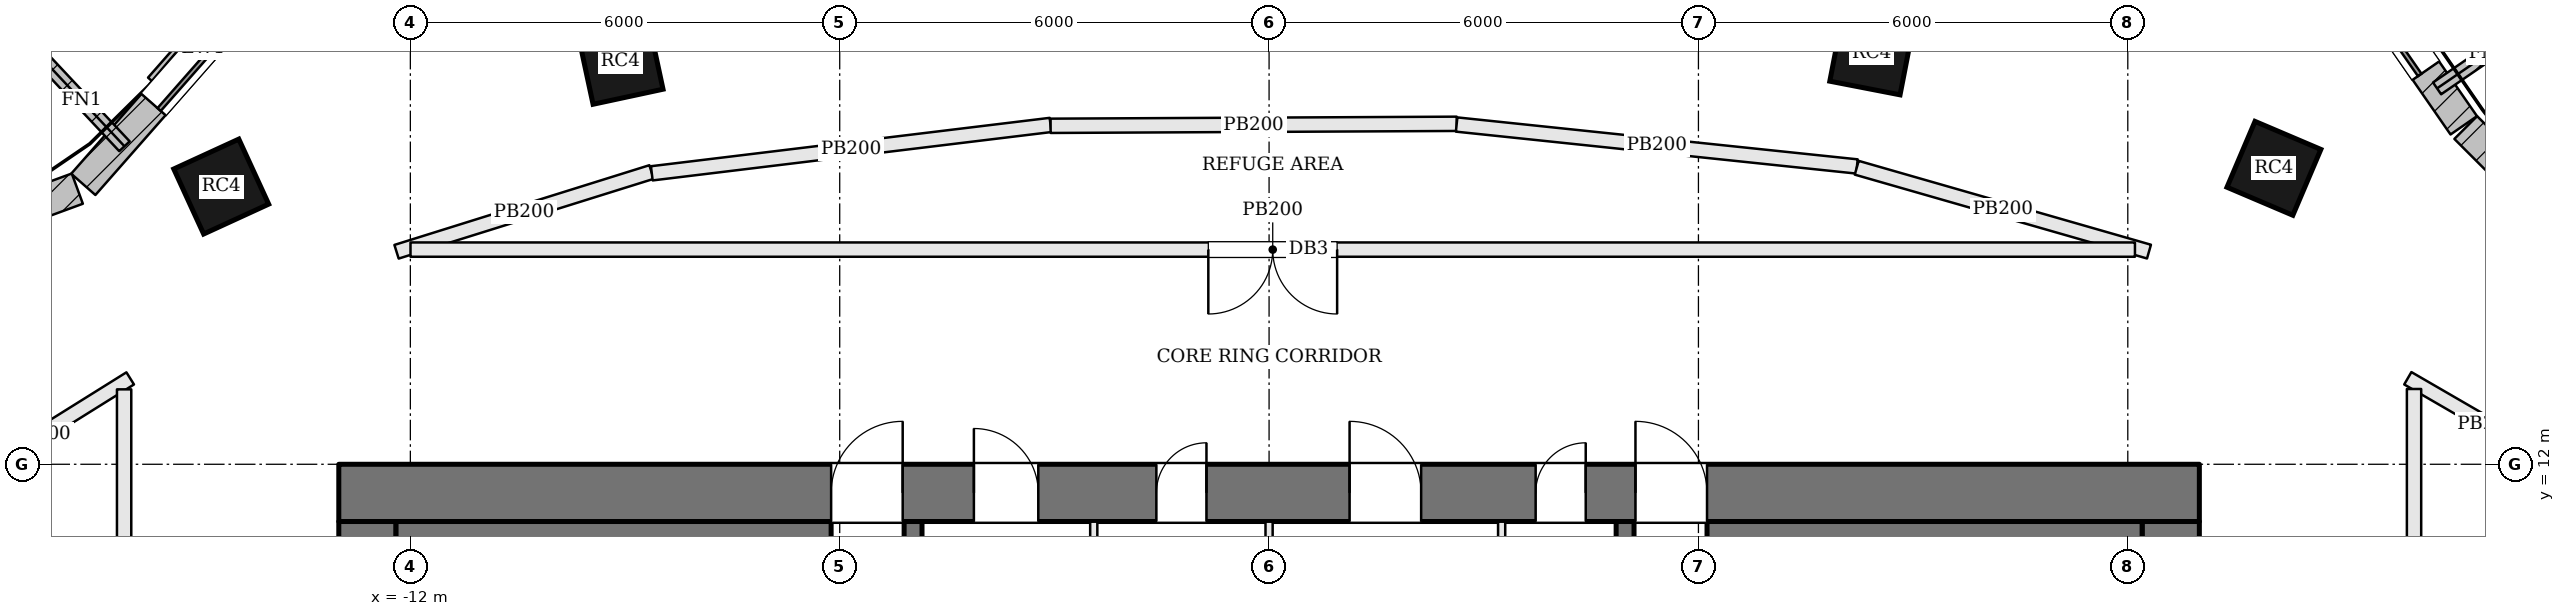
"""IFC4 building model, lengths in metres.
Left out: names, types, materials, properties, quantities, classifications, styles, units other than length and angle.
Written with IfcOpenShell. Run it as: python <this file> out.ifc"""

import sys

from ifc_helpers import new_model, si_unit, direction, frame, frame_2d, origin, origin_2d, place, context, subcontext, project, spatial, rectangle, extrude, element, fill, save


model = new_model("IFC4")
c1 = context("Model", 3, precision=1e-05, world=origin(), true_north=direction((0.0, 1.0)))
c2 = subcontext(c1, "Body", "Model", "MODEL_VIEW")
j1 = project(units=[si_unit("LENGTHUNIT", "METRE"), si_unit("PLANEANGLEUNIT", "RADIAN")], contexts=[c1])
p1 = place(None, origin())
s1 = spatial("IfcSite", under=j1, at=p1, CompositionType="ELEMENT")
p2 = place(p1, origin())
s2 = spatial("IfcBuilding", under=s1, at=p2, CompositionType="ELEMENT")
p3 = place(p2, frame((0.0, 0.0, 240.9)))
s3 = spatial("IfcBuildingStorey", under=s2, at=p3, CompositionType="ELEMENT", Elevation=240.9)
p4 = place(p3, frame((-13.0, 11.6, 0.0), z_axis=(0.0, 0.0, 1.0), x_axis=(1.0, 0.0, 0.0)))
e1 = element("IfcWall", 1, at=p4, inside=s3, PredefinedType="SHEAR", context=c2, shape_type="SweptSolid", body=[
    extrude(rectangle(XDim=26.0, YDim=0.8, at=frame_2d((13.0, 0.0))), origin(), (0.0, 0.0, 1.0), 3.9),
])
p5 = place(p4, frame((8.875, 0.0, 0.0)))
e2 = element("IfcOpeningElement", 2, at=p5, cuts=e1, PredefinedType="OPENING", context=c2, shape_type="SweptSolid", body=[
    extrude(rectangle(XDim=0.9, YDim=2.1, at=frame_2d((0.45, 1.05))), frame((0.0, 0.41, 0.0), z_axis=(0.0, -1.0, 0.0), x_axis=(1.0, 0.0, 0.0)), (0.0, 0.0, 1.0), 0.82),
])
p6 = place(p4, frame((11.425, 0.0, 0.0)))
e3 = element("IfcOpeningElement", 3, at=p6, cuts=e1, PredefinedType="OPENING", context=c2, shape_type="SweptSolid", body=[
    extrude(rectangle(XDim=0.7, YDim=2.1, at=frame_2d((0.35, 1.05))), frame((0.0, 0.41, 0.0), z_axis=(0.0, -1.0, 0.0), x_axis=(1.0, 0.0, 0.0)), (0.0, 0.0, 1.0), 0.82),
])
p7 = place(p4, frame((14.125, 0.0, 0.0)))
e4 = element("IfcOpeningElement", 4, at=p7, cuts=e1, PredefinedType="OPENING", context=c2, shape_type="SweptSolid", body=[
    extrude(rectangle(XDim=1.0, YDim=2.1, at=frame_2d((0.5, 1.05))), frame((0.0, 0.41, 0.0), z_axis=(0.0, -1.0, 0.0), x_axis=(1.0, 0.0, 0.0)), (0.0, 0.0, 1.0), 0.82),
])
p8 = place(p4, frame((16.725, 0.0, 0.0)))
e5 = element("IfcOpeningElement", 5, at=p8, cuts=e1, PredefinedType="OPENING", context=c2, shape_type="SweptSolid", body=[
    extrude(rectangle(XDim=0.7, YDim=2.1, at=frame_2d((0.35, 1.05))), frame((0.0, 0.41, 0.0), z_axis=(0.0, -1.0, 0.0), x_axis=(1.0, 0.0, 0.0)), (0.0, 0.0, 1.0), 0.82),
])
p9 = place(p4, frame((6.88, 0.0, 0.0)))
e6 = element("IfcOpeningElement", 6, at=p9, cuts=e1, PredefinedType="OPENING", context=c2, shape_type="SweptSolid", body=[
    extrude(rectangle(XDim=1.0, YDim=2.1, at=frame_2d((0.5, 1.05))), frame((0.0, 0.41, 0.0), z_axis=(0.0, -1.0, 0.0), x_axis=(1.0, 0.0, 0.0)), (0.0, 0.0, 1.0), 0.82),
])
p10 = place(p4, frame((18.12, 0.0, 0.0)))
e7 = element("IfcOpeningElement", 7, at=p10, cuts=e1, PredefinedType="OPENING", context=c2, shape_type="SweptSolid", body=[
    extrude(rectangle(XDim=1.0, YDim=2.1, at=frame_2d((0.5, 1.05))), frame((0.0, 0.41, 0.0), z_axis=(0.0, -1.0, 0.0), x_axis=(1.0, 0.0, 0.0)), (0.0, 0.0, 1.0), 0.82),
])
p11 = place(p3, frame((12.6, -2.2, 0.0), z_axis=(0.0, 0.0, 1.0), x_axis=(0.0, 1.0, 0.0)))
e8 = element("IfcWall", 8, at=p11, inside=s3, PredefinedType="SHEAR", context=c2, shape_type="SweptSolid", body=[
    extrude(rectangle(XDim=13.4, YDim=0.8, at=frame_2d((6.7, 0.0))), origin(), (0.0, 0.0, 1.0), 3.9),
])
p12 = place(p11, frame((7.4, 0.0, 0.0)))
e9 = element("IfcOpeningElement", 9, at=p12, cuts=e8, PredefinedType="OPENING", context=c2, shape_type="SweptSolid", body=[
    extrude(rectangle(XDim=1.8, YDim=2.1, at=frame_2d((0.9, 1.05))), frame((0.0, 0.41, 0.0), z_axis=(0.0, -1.0, 0.0), x_axis=(1.0, 0.0, 0.0)), (0.0, 0.0, 1.0), 0.82),
])
p13 = place(p3, frame((-12.6, -2.2, 0.0), z_axis=(0.0, 0.0, 1.0), x_axis=(0.0, 1.0, 0.0)))
e10 = element("IfcWall", 10, at=p13, inside=s3, PredefinedType="SHEAR", context=c2, shape_type="SweptSolid", body=[
    extrude(rectangle(XDim=13.4, YDim=0.8, at=frame_2d((6.7, 0.0))), origin(), (0.0, 0.0, 1.0), 3.9),
])
p14 = place(p13, frame((4.2, 0.0, 0.0)))
e11 = element("IfcOpeningElement", 11, at=p14, cuts=e10, PredefinedType="OPENING", context=c2, shape_type="SweptSolid", body=[
    extrude(rectangle(XDim=1.8, YDim=2.1, at=frame_2d((0.9, 1.05))), frame((0.0, 0.41, 0.0), z_axis=(0.0, -1.0, 0.0), x_axis=(1.0, 0.0, 0.0)), (0.0, 0.0, 1.0), 0.82),
])
for number, where, z_axis, x_axis in (
    (12, (14.042, 16.136, 0.0), (0.0, 0.0, 1.0), (-0.92, 0.392, 0.0)),
    (13, (8.422, 17.749, 0.0), (0.0, 0.0, 1.0), (-0.982, 0.191, 0.0)),
    (14, (-9.063, 17.625, 0.0), (0.0, 0.0, 1.0), (-0.978, -0.21, 0.0)),
    (15, (-14.643, 15.881, 0.0), (0.0, 0.0, 1.0), (-0.909, -0.417, 0.0)),
):
    element("IfcColumn", number, at=place(p3, frame(where, z_axis=z_axis, x_axis=x_axis)), inside=s3, PredefinedType="COLUMN", context=c2, shape_type="SweptSolid", body=[
        extrude(rectangle(XDim=1.0, YDim=1.0, at=origin_2d()), origin(), (0.0, 0.0, 1.0), 3.9),
    ])
p15 = place(p3, frame((19.145, 14.285, 0.0), z_axis=(0.0, 0.0, 1.0), x_axis=(-0.707427521052, 0.706785895769, 0.0)))
e16 = element("IfcWall", 16, at=p15, inside=s3, PredefinedType="SOLIDWALL", context=c2, shape_type="SweptSolid", body=[
    extrude(rectangle(XDim=3.425, YDim=0.45, at=frame_2d((1.712, 0.0))), origin(), (0.0, 0.0, 1.0), 3.7),
])
p16 = place(p15, frame((0.662, 0.0, 0.9)))
e17 = element("IfcOpeningElement", 17, at=p16, cuts=e16, PredefinedType="OPENING", context=c2, shape_type="SweptSolid", body=[
    extrude(rectangle(XDim=2.1, YDim=2.3, at=frame_2d((1.05, 1.15))), frame((0.0, 0.235, 0.0), z_axis=(0.0, -1.0, 0.0), x_axis=(1.0, 0.0, 0.0)), (0.0, 0.0, 1.0), 0.47),
])
p17 = place(p3, frame((16.695, 16.737, 0.0), z_axis=(0.0, 0.0, 1.0), x_axis=(-0.569652445465, 0.821885692402, 0.0)))
e18 = element("IfcWall", 18, at=p17, inside=s3, PredefinedType="SOLIDWALL", context=c2, shape_type="SweptSolid", body=[
    extrude(rectangle(XDim=3.959, YDim=0.45, at=frame_2d((1.979, 0.0))), origin(), (0.0, 0.0, 1.0), 3.7),
])
p18 = place(p17, frame((0.929, 0.0, 0.9)))
e19 = element("IfcOpeningElement", 19, at=p18, cuts=e18, PredefinedType="OPENING", context=c2, shape_type="SweptSolid", body=[
    extrude(rectangle(XDim=2.1, YDim=2.3, at=frame_2d((1.05, 1.15))), frame((0.0, 0.235, 0.0), z_axis=(0.0, -1.0, 0.0), x_axis=(1.0, 0.0, 0.0)), (0.0, 0.0, 1.0), 0.47),
])
p19 = place(p3, frame((-13.221, 19.719, 0.0), z_axis=(0.0, 0.0, 1.0), x_axis=(-0.660424908916, -0.750892095899, 0.0)))
e20 = element("IfcWall", 20, at=p19, inside=s3, PredefinedType="SOLIDWALL", context=c2, shape_type="SweptSolid", body=[
    extrude(rectangle(XDim=5.071, YDim=0.45, at=frame_2d((2.535, 0.0))), origin(), (0.0, 0.0, 1.0), 3.7),
])
p20 = place(p19, frame((1.485, 0.0, 0.9)))
e21 = element("IfcOpeningElement", 21, at=p20, cuts=e20, PredefinedType="OPENING", context=c2, shape_type="SweptSolid", body=[
    extrude(rectangle(XDim=2.1, YDim=2.3, at=frame_2d((1.05, 1.15))), frame((0.0, 0.235, 0.0), z_axis=(0.0, -1.0, 0.0), x_axis=(1.0, 0.0, 0.0)), (0.0, 0.0, 1.0), 0.47),
])
p21 = place(p3, frame((-16.654, 15.852, 0.0), z_axis=(0.0, 0.0, 1.0), x_axis=(-0.938636568132, -0.344907803572, 0.0)))
e22 = element("IfcWall", 22, at=p21, inside=s3, PredefinedType="SOLIDWALL", context=c2, shape_type="SweptSolid", body=[
    extrude(rectangle(XDim=3.887, YDim=0.45, at=frame_2d((1.944, 0.0))), origin(), (0.0, 0.0, 1.0), 3.7),
])
p22 = place(p21, frame((1.044, 0.0, 0.9)))
e23 = element("IfcOpeningElement", 23, at=p22, cuts=e22, PredefinedType="OPENING", context=c2, shape_type="SweptSolid", body=[
    extrude(rectangle(XDim=1.8, YDim=2.3, at=frame_2d((0.9, 1.15))), frame((0.0, 0.235, 0.0), z_axis=(0.0, -1.0, 0.0), x_axis=(1.0, 0.0, 0.0)), (0.0, 0.0, 1.0), 0.47),
])
p23 = place(p3, frame((16.322, 17.253, 0.0), z_axis=(0.0, 0.0, 1.0), x_axis=(0.824440606412, 0.565948483962, 0.0)))
e24 = element("IfcWall", 24, at=p23, inside=s3, PredefinedType="SOLIDWALL", context=c2, shape_type="SweptSolid", body=[
    extrude(rectangle(XDim=1.75, YDim=0.2, at=frame_2d((0.875, 0.0))), origin(), (0.0, 0.0, 1.0), 3.7),
])
p24 = place(p3, frame((-15.995, 16.444, 0.0), z_axis=(0.0, 0.0, 1.0), x_axis=(-0.683852936488, 0.729619874494, 0.0)))
e25 = element("IfcWall", 25, at=p24, inside=s3, PredefinedType="SOLIDWALL", context=c2, shape_type="SweptSolid", body=[
    extrude(rectangle(XDim=1.75, YDim=0.2, at=frame_2d((0.875, 0.0))), origin(), (0.0, 0.0, 1.0), 3.7),
])
p25 = place(p3, frame((-13.339, 19.822, 3.9), z_axis=(0.0, 0.0, 1.0), x_axis=(-0.660445690116, -0.7508738179, 0.0)))
e26 = element("IfcWall", 26, at=p25, inside=s3, PredefinedType="PARAPET", context=c2, shape_type="SweptSolid", body=[
    extrude(rectangle(XDim=3.353, YDim=0.3, at=frame_2d((1.677, 0.0))), origin(), (0.0, 0.0, 1.0), 1.1),
])
p26 = place(p3, frame((-4.975, -2.2, 0.0), z_axis=(0.0, 0.0, 1.0), x_axis=(0.0, 1.0, 0.0)))
e27 = element("IfcWall", 27, at=p26, inside=s3, PredefinedType="SOLIDWALL", context=c2, shape_type="SweptSolid", body=[
    extrude(rectangle(XDim=13.4, YDim=0.25, at=frame_2d((6.7, 0.0))), origin(), (0.0, 0.0, 1.0), 3.7),
])
p27 = place(p26, frame((5.25, 0.0, 0.0)))
e28 = element("IfcOpeningElement", 28, at=p27, cuts=e27, PredefinedType="OPENING", context=c2, shape_type="SweptSolid", body=[
    extrude(rectangle(XDim=1.2, YDim=2.1, at=frame_2d((0.6, 1.05))), frame((0.0, 0.135, 0.0), z_axis=(0.0, -1.0, 0.0), x_axis=(1.0, 0.0, 0.0)), (0.0, 0.0, 1.0), 0.27),
])
p28 = place(p3, frame((4.975, 11.2, 0.0), z_axis=(0.0, 0.0, 1.0), x_axis=(0.0, -1.0, 0.0)))
e29 = element("IfcWall", 29, at=p28, inside=s3, PredefinedType="SOLIDWALL", context=c2, shape_type="SweptSolid", body=[
    extrude(rectangle(XDim=13.4, YDim=0.25, at=frame_2d((6.7, 0.0))), origin(), (0.0, 0.0, 1.0), 3.7),
])
p29 = place(p28, frame((5.25, 0.0, 0.0)))
e30 = element("IfcOpeningElement", 30, at=p29, cuts=e29, PredefinedType="OPENING", context=c2, shape_type="SweptSolid", body=[
    extrude(rectangle(XDim=1.2, YDim=2.1, at=frame_2d((0.6, 1.05))), frame((0.0, 0.135, 0.0), z_axis=(0.0, -1.0, 0.0), x_axis=(1.0, 0.0, 0.0)), (0.0, 0.0, 1.0), 0.27),
])
for number, where, z_axis, x_axis in (
    (31, (-12.2, 10.9, 0.0), (0.0, 0.0, 1.0), (1.0, 0.0, 0.0)),
    (32, (12.2, 10.9, 0.0), (0.0, 0.0, 1.0), (-1.0, 0.0, 0.0)),
):
    element("IfcWall", number, at=place(p3, frame(where, z_axis=z_axis, x_axis=x_axis)), inside=s3, PredefinedType="SOLIDWALL", context=c2, shape_type="SweptSolid", body=[
        extrude(rectangle(XDim=6.08, YDim=0.6, at=frame_2d((3.04, 0.0))), origin(), (0.0, 0.0, 1.0), 3.7),
    ])
for number, where, z_axis, x_axis in (
    (33, (-2.45, 8.6, 0.0), (0.0, 0.0, 1.0), (0.0, 1.0, 0.0)),
    (34, (0.0, 8.6, 0.0), (0.0, 0.0, 1.0), (0.0, 1.0, 0.0)),
    (35, (3.25, 8.6, 0.0), (0.0, 0.0, 1.0), (0.0, 1.0, 0.0)),
):
    element("IfcWall", number, at=place(p3, frame(where, z_axis=z_axis, x_axis=x_axis)), inside=s3, PredefinedType="PARTITIONING", context=c2, shape_type="SweptSolid", body=[
        extrude(rectangle(XDim=2.6, YDim=0.1, at=frame_2d((1.3, 0.0))), origin(), (0.0, 0.0, 1.0), 3.7),
    ])
p30 = place(p3, frame((-18.422, 11.635, 0.0), z_axis=(0.0, 0.0, 1.0), x_axis=(0.848299824463, 0.529516201656, 0.0)))
e36 = element("IfcWall", 36, at=p30, inside=s3, PredefinedType="PARTITIONING", context=c2, shape_type="SweptSolid", body=[
    extrude(rectangle(XDim=2.955, YDim=0.2, at=frame_2d((1.478, 0.0))), origin(), (0.0, 0.0, 1.0), 3.7),
])
p31 = place(p3, frame((-16.0, 13.047, 0.0), z_axis=(0.0, 0.0, 1.0), x_axis=(0.0, -1.0, 0.0)))
e37 = element("IfcWall", 37, at=p31, inside=s3, PredefinedType="PARTITIONING", context=c2, shape_type="SweptSolid", body=[
    extrude(rectangle(XDim=18.947, YDim=0.2, at=frame_2d((9.474, 0.0))), origin(), (0.0, 0.0, 1.0), 3.7),
])
p32 = place(p31, frame((7.647, 0.0, 0.0)))
e38 = element("IfcOpeningElement", 38, at=p32, cuts=e37, PredefinedType="OPENING", context=c2, shape_type="SweptSolid", body=[
    extrude(rectangle(XDim=1.8, YDim=2.1, at=frame_2d((0.9, 1.05))), frame((0.0, 0.11, 0.0), z_axis=(0.0, -1.0, 0.0), x_axis=(1.0, 0.0, 0.0)), (0.0, 0.0, 1.0), 0.22),
])
p33 = place(p3, frame((15.913, 13.202, 0.0), z_axis=(0.0, 0.0, 1.0), x_axis=(0.86524014554, -0.501357647339, 0.0)))
e39 = element("IfcWall", 39, at=p33, inside=s3, PredefinedType="PARTITIONING", context=c2, shape_type="SweptSolid", body=[
    extrude(rectangle(XDim=2.575, YDim=0.2, at=frame_2d((1.288, 0.0))), origin(), (0.0, 0.0, 1.0), 3.7),
])
p34 = place(p3, frame((16.0, -5.9, 0.0), z_axis=(0.0, 0.0, 1.0), x_axis=(0.0, 1.0, 0.0)))
e40 = element("IfcWall", 40, at=p34, inside=s3, PredefinedType="PARTITIONING", context=c2, shape_type="SweptSolid", body=[
    extrude(rectangle(XDim=18.952, YDim=0.2, at=frame_2d((9.476, 0.0))), origin(), (0.0, 0.0, 1.0), 3.7),
])
p35 = place(p34, frame((9.5, 0.0, 0.0)))
e41 = element("IfcOpeningElement", 41, at=p35, cuts=e40, PredefinedType="OPENING", context=c2, shape_type="SweptSolid", body=[
    extrude(rectangle(XDim=1.8, YDim=2.1, at=frame_2d((0.9, 1.05))), frame((0.0, 0.11, 0.0), z_axis=(0.0, -1.0, 0.0), x_axis=(1.0, 0.0, 0.0)), (0.0, 0.0, 1.0), 0.22),
])
p36 = place(p3, frame((-12.193, 14.97, 0.0), z_axis=(0.0, 0.0, 1.0), x_axis=(0.954441570864, 0.298397868301, 0.0)))
e42 = element("IfcWall", 42, at=p36, inside=s3, PredefinedType="PARTITIONING", context=c2, shape_type="SweptSolid", body=[
    extrude(rectangle(XDim=3.733, YDim=0.2, at=frame_2d((1.867, 0.0))), origin(), (0.0, 0.0, 1.0), 3.7),
])
p37 = place(p3, frame((-8.626, 16.066, 0.0), z_axis=(0.0, 0.0, 1.0), x_axis=(0.992720392358, 0.120441780942, 0.0)))
e43 = element("IfcWall", 43, at=p37, inside=s3, PredefinedType="PARTITIONING", context=c2, shape_type="SweptSolid", body=[
    extrude(rectangle(XDim=5.613, YDim=0.2, at=frame_2d((2.806, 0.0))), origin(), (0.0, 0.0, 1.0), 3.7),
])
p38 = place(p3, frame((-3.053, 16.73, 0.0), z_axis=(0.0, 0.0, 1.0), x_axis=(0.999987762334, 0.004947239951, 0.0)))
e44 = element("IfcWall", 44, at=p38, inside=s3, PredefinedType="PARTITIONING", context=c2, shape_type="SweptSolid", body=[
    extrude(rectangle(XDim=5.675, YDim=0.2, at=frame_2d((2.837, 0.0))), origin(), (0.0, 0.0, 1.0), 3.7),
])
p39 = place(p3, frame((2.621, 16.748, 0.0), z_axis=(0.0, 0.0, 1.0), x_axis=(0.99455907377, -0.104174127222, 0.0)))
e45 = element("IfcWall", 45, at=p39, inside=s3, PredefinedType="PARTITIONING", context=c2, shape_type="SweptSolid", body=[
    extrude(rectangle(XDim=5.625, YDim=0.2, at=frame_2d((2.812, 0.0))), origin(), (0.0, 0.0, 1.0), 3.7),
])
p40 = place(p3, frame((8.212, 16.144, 0.0), z_axis=(0.0, 0.0, 1.0), x_axis=(0.961195849484, -0.275866886261, 0.0)))
e46 = element("IfcWall", 46, at=p40, inside=s3, PredefinedType="PARTITIONING", context=c2, shape_type="SweptSolid", body=[
    extrude(rectangle(XDim=4.249, YDim=0.2, at=frame_2d((2.125, 0.0))), origin(), (0.0, 0.0, 1.0), 3.7),
])
p41 = place(p3, frame((12.1, 15.0, 0.0), z_axis=(0.0, 0.0, 1.0), x_axis=(-1.0, 0.0, 0.0)))
e47 = element("IfcWall", 47, at=p41, inside=s3, PredefinedType="PARTITIONING", context=c2, shape_type="SweptSolid", body=[
    extrude(rectangle(XDim=24.098, YDim=0.2, at=frame_2d((12.049, 0.0))), origin(), (0.0, 0.0, 1.0), 3.7),
])
p42 = place(p41, frame((11.149, 0.0, 0.0)))
e48 = element("IfcOpeningElement", 48, at=p42, cuts=e47, PredefinedType="OPENING", context=c2, shape_type="SweptSolid", body=[
    extrude(rectangle(XDim=1.8, YDim=2.1, at=frame_2d((0.9, 1.05))), frame((0.0, 0.11, 0.0), z_axis=(0.0, -1.0, 0.0), x_axis=(1.0, 0.0, 0.0)), (0.0, 0.0, 1.0), 0.22),
])
p43 = place(p18, origin())
e49 = element("IfcWindow", 49, at=p43, inside=s3, PartitioningType="SINGLE_PANEL", PredefinedType="WINDOW", context=c2, shape_type="SweptSolid", body=[
    extrude(rectangle(XDim=2.1, YDim=2.3, at=frame_2d((1.05, 1.15))), frame((0.0, 0.135, 0.0), z_axis=(0.0, -1.0, 0.0), x_axis=(1.0, 0.0, 0.0)), (0.0, 0.0, 1.0), 0.06),
])
fill(e19, e49)
p44 = place(p20, origin())
e50 = element("IfcWindow", 50, at=p44, inside=s3, PartitioningType="SINGLE_PANEL", PredefinedType="WINDOW", context=c2, shape_type="SweptSolid", body=[
    extrude(rectangle(XDim=2.1, YDim=2.3, at=frame_2d((1.05, 1.15))), frame((0.0, 0.135, 0.0), z_axis=(0.0, -1.0, 0.0), x_axis=(1.0, 0.0, 0.0)), (0.0, 0.0, 1.0), 0.06),
])
fill(e21, e50)
p45 = place(p5, origin())
e51 = element("IfcDoor", 51, at=p45, inside=s3, OperationType="SINGLE_SWING_LEFT", PredefinedType="DOOR", context=c2, shape_type="SweptSolid", body=[
    extrude(rectangle(XDim=0.9, YDim=2.1, at=frame_2d((0.45, 1.05))), frame((0.0, 0.025, 0.0), z_axis=(0.0, -1.0, 0.0), x_axis=(1.0, 0.0, 0.0)), (0.0, 0.0, 1.0), 0.05),
])
fill(e2, e51)
p46 = place(p6, origin())
e52 = element("IfcDoor", 52, at=p46, inside=s3, OperationType="SINGLE_SWING_RIGHT", PredefinedType="DOOR", context=c2, shape_type="SweptSolid", body=[
    extrude(rectangle(XDim=0.7, YDim=2.1, at=frame_2d((0.35, 1.05))), frame((0.0, 0.025, 0.0), z_axis=(0.0, -1.0, 0.0), x_axis=(1.0, 0.0, 0.0)), (0.0, 0.0, 1.0), 0.05),
])
fill(e3, e52)
p47 = place(p7, origin())
e53 = element("IfcDoor", 53, at=p47, inside=s3, OperationType="SINGLE_SWING_LEFT", PredefinedType="DOOR", context=c2, shape_type="SweptSolid", body=[
    extrude(rectangle(XDim=1.0, YDim=2.1, at=frame_2d((0.5, 1.05))), frame((0.0, 0.025, 0.0), z_axis=(0.0, -1.0, 0.0), x_axis=(1.0, 0.0, 0.0)), (0.0, 0.0, 1.0), 0.05),
])
fill(e4, e53)
p48 = place(p8, origin())
e54 = element("IfcDoor", 54, at=p48, inside=s3, OperationType="SINGLE_SWING_RIGHT", PredefinedType="DOOR", context=c2, shape_type="SweptSolid", body=[
    extrude(rectangle(XDim=0.7, YDim=2.1, at=frame_2d((0.35, 1.05))), frame((0.0, 0.025, 0.0), z_axis=(0.0, -1.0, 0.0), x_axis=(1.0, 0.0, 0.0)), (0.0, 0.0, 1.0), 0.05),
])
fill(e5, e54)
p49 = place(p9, origin())
e55 = element("IfcDoor", 55, at=p49, inside=s3, OperationType="SINGLE_SWING_RIGHT", PredefinedType="DOOR", context=c2, shape_type="SweptSolid", body=[
    extrude(rectangle(XDim=1.0, YDim=2.1, at=frame_2d((0.5, 1.05))), frame((0.0, 0.025, 0.0), z_axis=(0.0, -1.0, 0.0), x_axis=(1.0, 0.0, 0.0)), (0.0, 0.0, 1.0), 0.05),
])
fill(e6, e55)
p50 = place(p10, origin())
e56 = element("IfcDoor", 56, at=p50, inside=s3, OperationType="SINGLE_SWING_LEFT", PredefinedType="DOOR", context=c2, shape_type="SweptSolid", body=[
    extrude(rectangle(XDim=1.0, YDim=2.1, at=frame_2d((0.5, 1.05))), frame((0.0, 0.025, 0.0), z_axis=(0.0, -1.0, 0.0), x_axis=(1.0, 0.0, 0.0)), (0.0, 0.0, 1.0), 0.05),
])
fill(e7, e56)
p51 = place(p42, origin())
e57 = element("IfcDoor", 57, at=p51, inside=s3, OperationType="DOUBLE_DOOR_SINGLE_SWING", PredefinedType="DOOR", context=c2, shape_type="SweptSolid", body=[
    extrude(rectangle(XDim=1.8, YDim=2.1, at=frame_2d((0.9, 1.05))), frame((0.0, 0.025, 0.0), z_axis=(0.0, -1.0, 0.0), x_axis=(1.0, 0.0, 0.0)), (0.0, 0.0, 1.0), 0.05),
])
fill(e48, e57)
save(model, sys.argv[1])
